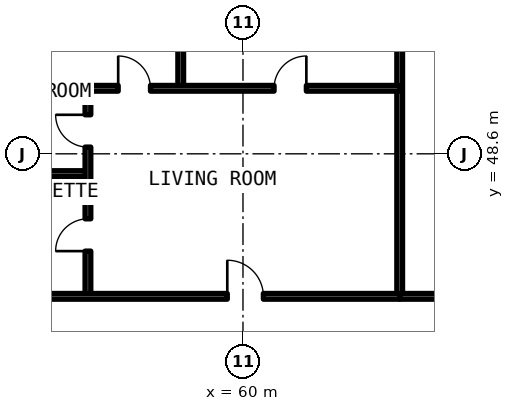
"""IFC4 building model, lengths in metres.
Left out: names, types, materials, properties, quantities, classifications, styles, units other than length and angle.
Written with IfcOpenShell. Run it as: python <this file> out.ifc"""

import sys

from ifc_helpers import new_model, si_unit, direction, frame, frame_2d, origin, place, context, subcontext, project, spatial, rectangle, extrude, element, fill, save


model = new_model("IFC4")
c1 = context("Model", 3, precision=1e-05, world=origin(), true_north=direction((0.0, 1.0)))
c2 = subcontext(c1, "Body", "Model", "MODEL_VIEW")
j1 = project(units=[si_unit("LENGTHUNIT", "METRE"), si_unit("PLANEANGLEUNIT", "RADIAN")], contexts=[c1])
p1 = place(None, origin())
s1 = spatial("IfcSite", under=j1, at=p1, CompositionType="ELEMENT")
p2 = place(p1, origin())
s2 = spatial("IfcBuilding", under=s1, at=p2, CompositionType="ELEMENT")
p3 = place(p2, frame((0.0, 0.0, 165.66)))
s3 = spatial("IfcBuildingStorey", under=s2, at=p3, CompositionType="ELEMENT", Elevation=165.66)
p4 = place(p3, frame((64.124, 44.85, 0.0), z_axis=(0.0, 0.0, 1.0), x_axis=(0.0, 1.0, 0.0)))
e1 = element("IfcWall", 1, at=p4, inside=s3, PredefinedType="SOLIDWALL", context=c2, shape_type="SweptSolid", body=[
    extrude(rectangle(XDim=10.2, YDim=0.15, at=frame_2d((5.1, 0.0))), origin(), (0.0, 0.0, 1.0), 2.63),
])
p5 = place(p3, frame((52.12, 48.08, 0.0), z_axis=(0.0, 0.0, 1.0), x_axis=(1.0, 0.0, 0.0)))
e2 = element("IfcWall", 2, at=p5, inside=s3, PredefinedType="PARTITIONING", context=c2, shape_type="SweptSolid", body=[
    extrude(rectangle(XDim=3.8, YDim=0.15, at=frame_2d((1.9, 0.0))), origin(), (0.0, 0.0, 1.0), 2.63),
])
p6 = place(p3, frame((55.92, 44.85, 0.0), z_axis=(0.0, 0.0, 1.0), x_axis=(0.0, 1.0, 0.0)))
e3 = element("IfcWall", 3, at=p6, inside=s3, PredefinedType="PARTITIONING", context=c2, shape_type="SweptSolid", body=[
    extrude(rectangle(XDim=5.474, YDim=0.15, at=frame_2d((2.737, 0.0))), origin(), (0.0, 0.0, 1.0), 2.63),
])
p7 = place(p6, frame((1.19, 0.0, 0.0)))
e4 = element("IfcOpeningElement", 4, at=p7, cuts=e3, PredefinedType="OPENING", context=c2, shape_type="SweptSolid", body=[
    extrude(rectangle(XDim=0.85, YDim=2.1, at=frame_2d((0.425, 1.05))), frame((0.0, 0.085, 0.0), z_axis=(0.0, -1.0, 0.0), x_axis=(1.0, 0.0, 0.0)), (0.0, 0.0, 1.0), 0.17),
])
p8 = place(p6, frame((3.927, 0.0, 0.0)))
e5 = element("IfcOpeningElement", 5, at=p8, cuts=e3, PredefinedType="OPENING", context=c2, shape_type="SweptSolid", body=[
    extrude(rectangle(XDim=0.85, YDim=2.1, at=frame_2d((0.425, 1.05))), frame((0.0, 0.085, 0.0), z_axis=(0.0, -1.0, 0.0), x_axis=(1.0, 0.0, 0.0)), (0.0, 0.0, 1.0), 0.17),
])
p9 = place(p3, frame((58.362, 50.324, 0.0), z_axis=(0.0, 0.0, 1.0), x_axis=(0.0, 1.0, 0.0)))
e6 = element("IfcWall", 6, at=p9, inside=s3, PredefinedType="PARTITIONING", context=c2, shape_type="SweptSolid", body=[
    extrude(rectangle(XDim=4.726, YDim=0.15, at=frame_2d((2.363, 0.0))), origin(), (0.0, 0.0, 1.0), 2.63),
])
p10 = place(p3, frame((52.12, 50.324, 0.0), z_axis=(0.0, 0.0, 1.0), x_axis=(1.0, 0.0, 0.0)))
e7 = element("IfcWall", 7, at=p10, inside=s3, PredefinedType="PARTITIONING", context=c2, shape_type="SweptSolid", body=[
    extrude(rectangle(XDim=12.004, YDim=0.15, at=frame_2d((6.002, 0.0))), origin(), (0.0, 0.0, 1.0), 2.63),
])
p11 = place(p10, frame((4.596, 0.0, 0.0)))
e8 = element("IfcOpeningElement", 8, at=p11, cuts=e7, PredefinedType="OPENING", context=c2, shape_type="SweptSolid", body=[
    extrude(rectangle(XDim=0.85, YDim=2.1, at=frame_2d((0.425, 1.05))), frame((0.0, 0.085, 0.0), z_axis=(0.0, -1.0, 0.0), x_axis=(1.0, 0.0, 0.0)), (0.0, 0.0, 1.0), 0.17),
])
p12 = place(p10, frame((8.698, 0.0, 0.0)))
e9 = element("IfcOpeningElement", 9, at=p12, cuts=e7, PredefinedType="OPENING", context=c2, shape_type="SweptSolid", body=[
    extrude(rectangle(XDim=0.85, YDim=2.1, at=frame_2d((0.425, 1.05))), frame((0.0, 0.085, 0.0), z_axis=(0.0, -1.0, 0.0), x_axis=(1.0, 0.0, 0.0)), (0.0, 0.0, 1.0), 0.17),
])
p13 = place(p3, frame((52.12, 44.85, 0.0), z_axis=(0.0, 0.0, 1.0), x_axis=(1.0, 0.0, 0.0)))
e10 = element("IfcWall", 10, at=p13, inside=s3, PredefinedType="SOLIDWALL", context=c2, shape_type="SweptSolid", body=[
    extrude(rectangle(XDim=12.004, YDim=0.15, at=frame_2d((6.002, 0.0))), origin(), (0.0, 0.0, 1.0), 2.63),
])
p14 = place(p13, frame((7.467, 0.0, 0.0)))
e11 = element("IfcOpeningElement", 11, at=p14, cuts=e10, PredefinedType="OPENING", context=c2, shape_type="SweptSolid", body=[
    extrude(rectangle(XDim=0.95, YDim=2.15, at=frame_2d((0.475, 1.075))), frame((0.0, 0.085, 0.0), z_axis=(0.0, -1.0, 0.0), x_axis=(1.0, 0.0, 0.0)), (0.0, 0.0, 1.0), 0.17),
])
p15 = place(p3, frame((64.124, 44.85, 0.0), z_axis=(0.0, 0.0, 1.0), x_axis=(1.0, 0.0, 0.0)))
e12 = element("IfcWall", 12, at=p15, inside=s3, PredefinedType="SOLIDWALL", context=c2, shape_type="SweptSolid", body=[
    extrude(rectangle(XDim=9.603, YDim=0.15, at=frame_2d((4.801, 0.0))), origin(), (0.0, 0.0, 1.0), 2.63),
])
p16 = place(p15, frame((4.251, 0.0, 0.0)))
e13 = element("IfcOpeningElement", 13, at=p16, cuts=e12, PredefinedType="OPENING", context=c2, shape_type="SweptSolid", body=[
    extrude(rectangle(XDim=1.1, YDim=2.15, at=frame_2d((0.55, 1.075))), frame((0.0, 0.085, 0.0), z_axis=(0.0, -1.0, 0.0), x_axis=(1.0, 0.0, 0.0)), (0.0, 0.0, 1.0), 0.17),
])
p17 = place(p7, origin())
e14 = element("IfcDoor", 14, at=p17, inside=s3, OperationType="SINGLE_SWING_LEFT", PredefinedType="DOOR", context=c2, shape_type="SweptSolid", body=[
    extrude(rectangle(XDim=0.85, YDim=2.1, at=frame_2d((0.425, 1.05))), frame((0.0, 0.025, 0.0), z_axis=(0.0, -1.0, 0.0), x_axis=(1.0, 0.0, 0.0)), (0.0, 0.0, 1.0), 0.05),
])
fill(e4, e14)
p18 = place(p8, origin())
e15 = element("IfcDoor", 15, at=p18, inside=s3, OperationType="SINGLE_SWING_RIGHT", PredefinedType="DOOR", context=c2, shape_type="SweptSolid", body=[
    extrude(rectangle(XDim=0.85, YDim=2.1, at=frame_2d((0.425, 1.05))), frame((0.0, 0.025, 0.0), z_axis=(0.0, -1.0, 0.0), x_axis=(1.0, 0.0, 0.0)), (0.0, 0.0, 1.0), 0.05),
])
fill(e5, e15)
p19 = place(p11, origin())
e16 = element("IfcDoor", 16, at=p19, inside=s3, OperationType="SINGLE_SWING_LEFT", PredefinedType="DOOR", context=c2, shape_type="SweptSolid", body=[
    extrude(rectangle(XDim=0.85, YDim=2.1, at=frame_2d((0.425, 1.05))), frame((0.0, 0.025, 0.0), z_axis=(0.0, -1.0, 0.0), x_axis=(1.0, 0.0, 0.0)), (0.0, 0.0, 1.0), 0.05),
])
fill(e8, e16)
p20 = place(p12, origin())
e17 = element("IfcDoor", 17, at=p20, inside=s3, OperationType="SINGLE_SWING_RIGHT", PredefinedType="DOOR", context=c2, shape_type="SweptSolid", body=[
    extrude(rectangle(XDim=0.85, YDim=2.1, at=frame_2d((0.425, 1.05))), frame((0.0, 0.025, 0.0), z_axis=(0.0, -1.0, 0.0), x_axis=(1.0, 0.0, 0.0)), (0.0, 0.0, 1.0), 0.05),
])
fill(e9, e17)
p21 = place(p14, origin())
e18 = element("IfcDoor", 18, at=p21, inside=s3, OperationType="SINGLE_SWING_LEFT", PredefinedType="DOOR", context=c2, shape_type="SweptSolid", body=[
    extrude(rectangle(XDim=0.95, YDim=2.15, at=frame_2d((0.475, 1.075))), frame((0.0, 0.025, 0.0), z_axis=(0.0, -1.0, 0.0), x_axis=(1.0, 0.0, 0.0)), (0.0, 0.0, 1.0), 0.05),
])
fill(e11, e18)
save(model, sys.argv[1])
